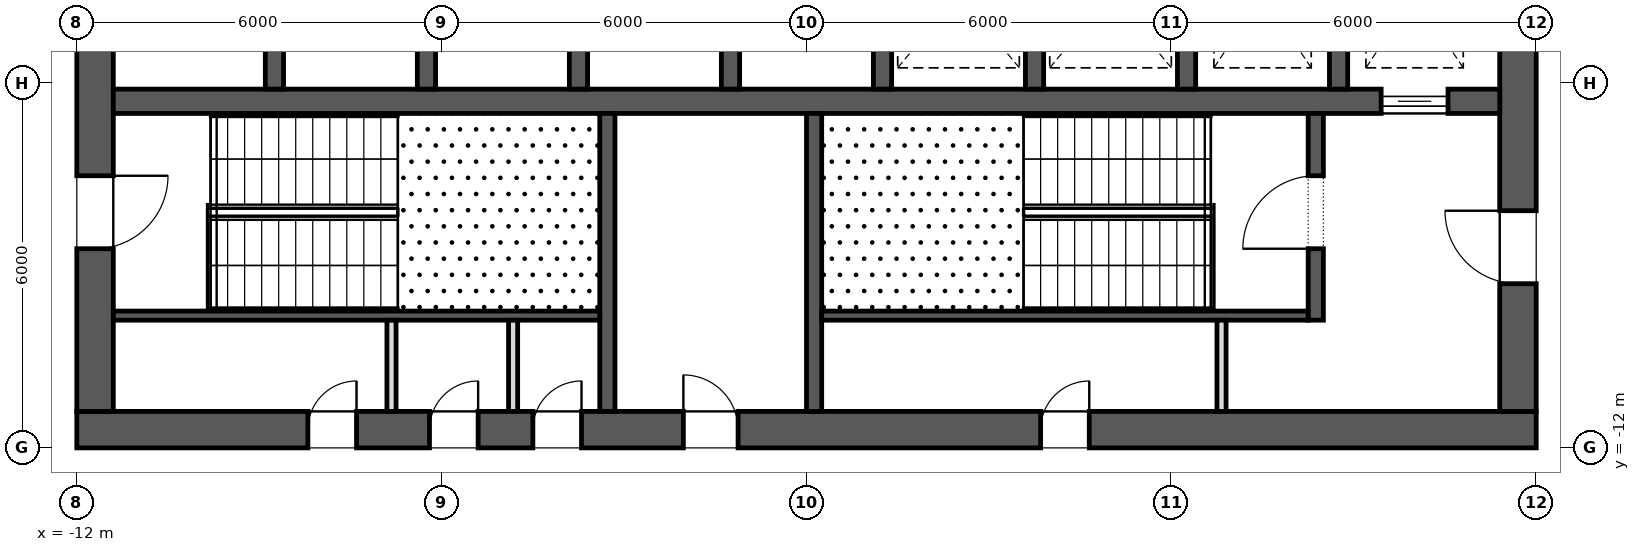
"""IFC4 building model, lengths in metres.
Left out: names, types, materials, properties, quantities, classifications, styles, units other than length and angle.
Written with IfcOpenShell. Run it as: python <this file> out.ifc"""

import sys

from ifc_helpers import new_model, si_unit, direction, frame, frame_2d, origin, place, context, subcontext, project, spatial, rectangle, extrude, element, fill, save


model = new_model("IFC4")
c1 = context("Model", 3, precision=1e-05, world=origin(), true_north=direction((0.0, 1.0)))
c2 = subcontext(c1, "Body", "Model", "MODEL_VIEW")
j1 = project(units=[si_unit("LENGTHUNIT", "METRE"), si_unit("PLANEANGLEUNIT", "RADIAN")], contexts=[c1])
p1 = place(None, origin())
s1 = spatial("IfcSite", under=j1, at=p1, CompositionType="ELEMENT")
p2 = place(p1, origin())
s2 = spatial("IfcBuilding", under=s1, at=p2, CompositionType="ELEMENT")
p3 = place(p2, frame((0.0, 0.0, 125.5)))
s3 = spatial("IfcBuildingStorey", under=s2, at=p3, CompositionType="ELEMENT", Elevation=125.5)
p4 = place(p3, frame((-12.0, -11.7, 0.0), z_axis=(0.0, 0.0, 1.0), x_axis=(1.0, 0.0, 0.0)))
e1 = element("IfcWall", 1, at=p4, inside=s3, PredefinedType="SHEAR", context=c2, shape_type="SweptSolid", body=[
    extrude(rectangle(XDim=24.0, YDim=0.6, at=frame_2d((12.0, 0.0))), origin(), (0.0, 0.0, 1.0), 4.2),
])
p5 = place(p4, frame((9.975, 0.0, 0.0)))
e2 = element("IfcOpeningElement", 2, at=p5, cuts=e1, PredefinedType="OPENING", context=c2, shape_type="SweptSolid", body=[
    extrude(rectangle(XDim=0.9, YDim=2.1, at=frame_2d((0.45, 1.05))), frame((0.0, 0.312, 0.0), z_axis=(0.0, -1.0, 0.0), x_axis=(1.0, 0.0, 0.0)), (0.0, 0.0, 1.0), 0.624),
])
p6 = place(p4, frame((3.8, 0.0, 0.0)))
e3 = element("IfcOpeningElement", 3, at=p6, cuts=e1, PredefinedType="OPENING", context=c2, shape_type="SweptSolid", body=[
    extrude(rectangle(XDim=0.8, YDim=2.1, at=frame_2d((0.4, 1.05))), frame((0.0, 0.312, 0.0), z_axis=(0.0, -1.0, 0.0), x_axis=(1.0, 0.0, 0.0)), (0.0, 0.0, 1.0), 0.624),
])
p7 = place(p4, frame((5.8, 0.0, 0.0)))
e4 = element("IfcOpeningElement", 4, at=p7, cuts=e1, PredefinedType="OPENING", context=c2, shape_type="SweptSolid", body=[
    extrude(rectangle(XDim=0.8, YDim=2.1, at=frame_2d((0.4, 1.05))), frame((0.0, 0.312, 0.0), z_axis=(0.0, -1.0, 0.0), x_axis=(1.0, 0.0, 0.0)), (0.0, 0.0, 1.0), 0.624),
])
p8 = place(p4, frame((7.5, 0.0, 0.0)))
e5 = element("IfcOpeningElement", 5, at=p8, cuts=e1, PredefinedType="OPENING", context=c2, shape_type="SweptSolid", body=[
    extrude(rectangle(XDim=0.8, YDim=2.1, at=frame_2d((0.4, 1.05))), frame((0.0, 0.312, 0.0), z_axis=(0.0, -1.0, 0.0), x_axis=(1.0, 0.0, 0.0)), (0.0, 0.0, 1.0), 0.624),
])
p9 = place(p4, frame((15.85, 0.0, 0.0)))
e6 = element("IfcOpeningElement", 6, at=p9, cuts=e1, PredefinedType="OPENING", context=c2, shape_type="SweptSolid", body=[
    extrude(rectangle(XDim=0.8, YDim=2.1, at=frame_2d((0.4, 1.05))), frame((0.0, 0.312, 0.0), z_axis=(0.0, -1.0, 0.0), x_axis=(1.0, 0.0, 0.0)), (0.0, 0.0, 1.0), 0.624),
])
p10 = place(p3, frame((11.7, -11.4, 0.0), z_axis=(0.0, 0.0, 1.0), x_axis=(0.0, 1.0, 0.0)))
e7 = element("IfcWall", 7, at=p10, inside=s3, PredefinedType="SHEAR", context=c2, shape_type="SweptSolid", body=[
    extrude(rectangle(XDim=22.8, YDim=0.6, at=frame_2d((11.4, 0.0))), origin(), (0.0, 0.0, 1.0), 4.2),
])
p11 = place(p10, frame((10.2, 0.0, 0.0)))
e8 = element("IfcOpeningElement", 8, at=p11, cuts=e7, PredefinedType="OPENING", context=c2, shape_type="SweptSolid", body=[
    extrude(rectangle(XDim=2.4, YDim=2.1, at=frame_2d((1.2, 1.05))), frame((0.0, 0.312, 0.0), z_axis=(0.0, -1.0, 0.0), x_axis=(1.0, 0.0, 0.0)), (0.0, 0.0, 1.0), 0.624),
])
p12 = place(p10, frame((19.5, 0.0, 0.0)))
e9 = element("IfcOpeningElement", 9, at=p12, cuts=e7, PredefinedType="OPENING", context=c2, shape_type="SweptSolid", body=[
    extrude(rectangle(XDim=1.2, YDim=2.1, at=frame_2d((0.6, 1.05))), frame((0.0, 0.312, 0.0), z_axis=(0.0, -1.0, 0.0), x_axis=(1.0, 0.0, 0.0)), (0.0, 0.0, 1.0), 0.624),
])
p13 = place(p10, frame((2.1, 0.0, 0.0)))
e10 = element("IfcOpeningElement", 10, at=p13, cuts=e7, PredefinedType="OPENING", context=c2, shape_type="SweptSolid", body=[
    extrude(rectangle(XDim=1.2, YDim=2.1, at=frame_2d((0.6, 1.05))), frame((0.0, 0.312, 0.0), z_axis=(0.0, -1.0, 0.0), x_axis=(1.0, 0.0, 0.0)), (0.0, 0.0, 1.0), 0.624),
])
p14 = place(p3, frame((-11.7, -11.4, 0.0), z_axis=(0.0, 0.0, 1.0), x_axis=(0.0, 1.0, 0.0)))
e11 = element("IfcWall", 11, at=p14, inside=s3, PredefinedType="SHEAR", context=c2, shape_type="SweptSolid", body=[
    extrude(rectangle(XDim=22.8, YDim=0.6, at=frame_2d((11.4, 0.0))), origin(), (0.0, 0.0, 1.0), 4.2),
])
p15 = place(p14, frame((10.2, 0.0, 0.0)))
e12 = element("IfcOpeningElement", 12, at=p15, cuts=e11, PredefinedType="OPENING", context=c2, shape_type="SweptSolid", body=[
    extrude(rectangle(XDim=2.4, YDim=2.1, at=frame_2d((1.2, 1.05))), frame((0.0, 0.312, 0.0), z_axis=(0.0, -1.0, 0.0), x_axis=(1.0, 0.0, 0.0)), (0.0, 0.0, 1.0), 0.624),
])
p16 = place(p14, frame((18.925, 0.0, 0.0)))
e13 = element("IfcOpeningElement", 13, at=p16, cuts=e11, PredefinedType="OPENING", context=c2, shape_type="SweptSolid", body=[
    extrude(rectangle(XDim=1.2, YDim=2.1, at=frame_2d((0.6, 1.05))), frame((0.0, 0.312, 0.0), z_axis=(0.0, -1.0, 0.0), x_axis=(1.0, 0.0, 0.0)), (0.0, 0.0, 1.0), 0.624),
])
p17 = place(p14, frame((2.675, 0.0, 0.0)))
e14 = element("IfcOpeningElement", 14, at=p17, cuts=e11, PredefinedType="OPENING", context=c2, shape_type="SweptSolid", body=[
    extrude(rectangle(XDim=1.2, YDim=2.1, at=frame_2d((0.6, 1.05))), frame((0.0, 0.312, 0.0), z_axis=(0.0, -1.0, 0.0), x_axis=(1.0, 0.0, 0.0)), (0.0, 0.0, 1.0), 0.624),
])
p18 = place(p3, frame((-11.4, -6.3, 0.0), z_axis=(0.0, 0.0, 1.0), x_axis=(1.0, 0.0, 0.0)))
e15 = element("IfcWall", 15, at=p18, inside=s3, PredefinedType="SHEAR", context=c2, shape_type="SweptSolid", body=[
    extrude(rectangle(XDim=22.8, YDim=0.4, at=frame_2d((11.4, 0.0))), origin(), (0.0, 0.0, 1.0), 4.2),
])
p19 = place(p18, frame((20.85, 0.0, 0.0)))
e16 = element("IfcOpeningElement", 16, at=p19, cuts=e15, PredefinedType="OPENING", context=c2, shape_type="SweptSolid", body=[
    extrude(rectangle(XDim=1.1, YDim=2.1, at=frame_2d((0.55, 1.05))), frame((0.0, 0.212, 0.0), z_axis=(0.0, -1.0, 0.0), x_axis=(1.0, 0.0, 0.0)), (0.0, 0.0, 1.0), 0.424),
])
for number, where, z_axis, x_axis in (
    (17, (-8.75, -6.1, 0.0), (0.0, 0.0, 1.0), (0.0, 1.0, 0.0)),
    (18, (-6.25, -6.1, 0.0), (0.0, 0.0, 1.0), (0.0, 1.0, 0.0)),
    (19, (-3.75, -6.1, 0.0), (0.0, 0.0, 1.0), (0.0, 1.0, 0.0)),
    (20, (-1.25, -6.1, 0.0), (0.0, 0.0, 1.0), (0.0, 1.0, 0.0)),
    (21, (1.25, -6.1, 0.0), (0.0, 0.0, 1.0), (0.0, 1.0, 0.0)),
    (22, (3.75, -6.1, 0.0), (0.0, 0.0, 1.0), (0.0, 1.0, 0.0)),
    (23, (6.25, -6.1, 0.0), (0.0, 0.0, 1.0), (0.0, 1.0, 0.0)),
    (24, (8.75, -6.1, 0.0), (0.0, 0.0, 1.0), (0.0, 1.0, 0.0)),
):
    element("IfcWall", number, at=place(p3, frame(where, z_axis=z_axis, x_axis=x_axis)), inside=s3, PredefinedType="SHEAR", context=c2, shape_type="SweptSolid", body=[
        extrude(rectangle(XDim=2.9, YDim=0.3, at=frame_2d((1.45, 0.0))), origin(), (0.0, 0.0, 1.0), 4.2),
    ])
for number, where, z_axis, x_axis in (
    (25, (-3.275, -11.4, 0.0), (0.0, 0.0, 1.0), (0.0, 1.0, 0.0)),
    (26, (0.125, -11.4, 0.0), (0.0, 0.0, 1.0), (0.0, 1.0, 0.0)),
):
    element("IfcWall", number, at=place(p3, frame(where, z_axis=z_axis, x_axis=x_axis)), inside=s3, PredefinedType="SHEAR", context=c2, shape_type="SweptSolid", body=[
        extrude(rectangle(XDim=4.9, YDim=0.25, at=frame_2d((2.45, 0.0))), origin(), (0.0, 0.0, 1.0), 3.9),
    ])
p20 = place(p3, frame((8.375, -9.9, 0.0), z_axis=(0.0, 0.0, 1.0), x_axis=(0.0, 1.0, 0.0)))
e27 = element("IfcWall", 27, at=p20, inside=s3, PredefinedType="SHEAR", context=c2, shape_type="SweptSolid", body=[
    extrude(rectangle(XDim=3.4, YDim=0.25, at=frame_2d((1.7, 0.0))), origin(), (0.0, 0.0, 1.0), 3.9),
])
p21 = place(p20, frame((1.175, 0.0, 0.0)))
e28 = element("IfcOpeningElement", 28, at=p21, cuts=e27, PredefinedType="OPENING", context=c2, shape_type="SweptSolid", body=[
    extrude(rectangle(XDim=1.2, YDim=2.1, at=frame_2d((0.6, 1.05))), frame((0.0, 0.137, 0.0), z_axis=(0.0, -1.0, 0.0), x_axis=(1.0, 0.0, 0.0)), (0.0, 0.0, 1.0), 0.274),
])
for number, where, z_axis, x_axis in (
    (29, (-11.4, -9.825, 0.0), (0.0, 0.0, 1.0), (1.0, 0.0, 0.0)),
    (30, (0.25, -9.825, 0.0), (0.0, 0.0, 1.0), (1.0, 0.0, 0.0)),
):
    element("IfcWall", number, at=place(p3, frame(where, z_axis=z_axis, x_axis=x_axis)), inside=s3, PredefinedType="SHEAR", context=c2, shape_type="SweptSolid", body=[
        extrude(rectangle(XDim=8.0, YDim=0.15, at=frame_2d((4.0, 0.0))), origin(), (0.0, 0.0, 1.0), 3.9),
    ])
for number, where, z_axis, x_axis in (
    (31, (-6.825, -11.4, 0.0), (0.0, 0.0, 1.0), (0.0, 1.0, 0.0)),
    (32, (-4.825, -11.4, 0.0), (0.0, 0.0, 1.0), (0.0, 1.0, 0.0)),
    (33, (6.825, -11.4, 0.0), (0.0, 0.0, 1.0), (0.0, 1.0, 0.0)),
):
    element("IfcWall", number, at=place(p3, frame(where, z_axis=z_axis, x_axis=x_axis)), inside=s3, PredefinedType="PARTITIONING", context=c2, shape_type="SweptSolid", body=[
        extrude(rectangle(XDim=1.5, YDim=0.15, at=frame_2d((0.75, 0.0))), origin(), (0.0, 0.0, 1.0), 3.9),
    ])
p22 = place(p19, origin())
e34 = element("IfcDoor", 34, at=p22, inside=s3, OperationType="SLIDING_TO_LEFT", PredefinedType="DOOR", context=c2, shape_type="SweptSolid", body=[
    extrude(rectangle(XDim=1.1, YDim=2.1, at=frame_2d((0.55, 1.05))), frame((0.0, 0.025, 0.0), z_axis=(0.0, -1.0, 0.0), x_axis=(1.0, 0.0, 0.0)), (0.0, 0.0, 1.0), 0.05),
])
fill(e16, e34)
p23 = place(p17, frame((1.2, 0.0, 0.0), z_axis=(0.0, 0.0, 1.0), x_axis=(-1.0, 0.0, 0.0)))
e35 = element("IfcDoor", 35, at=p23, inside=s3, OperationType="SINGLE_SWING_RIGHT", PredefinedType="DOOR", context=c2, shape_type="SweptSolid", body=[
    extrude(rectangle(XDim=1.2, YDim=2.1, at=frame_2d((0.6, 1.05))), frame((0.0, 0.025, 0.0), z_axis=(0.0, -1.0, 0.0), x_axis=(1.0, 0.0, 0.0)), (0.0, 0.0, 1.0), 0.05),
])
fill(e14, e35)
p24 = place(p21, origin())
e36 = element("IfcDoor", 36, at=p24, inside=s3, OperationType="SINGLE_SWING_RIGHT", PredefinedType="DOOR", context=c2, shape_type="SweptSolid", body=[
    extrude(rectangle(XDim=1.2, YDim=2.1, at=frame_2d((0.6, 1.05))), frame((0.0, 0.025, 0.0), z_axis=(0.0, -1.0, 0.0), x_axis=(1.0, 0.0, 0.0)), (0.0, 0.0, 1.0), 0.05),
])
fill(e28, e36)
p25 = place(p13, origin())
e37 = element("IfcDoor", 37, at=p25, inside=s3, OperationType="SINGLE_SWING_LEFT", PredefinedType="DOOR", context=c2, shape_type="SweptSolid", body=[
    extrude(rectangle(XDim=1.2, YDim=2.1, at=frame_2d((0.6, 1.05))), frame((0.0, 0.025, 0.0), z_axis=(0.0, -1.0, 0.0), x_axis=(1.0, 0.0, 0.0)), (0.0, 0.0, 1.0), 0.05),
])
fill(e10, e37)
p26 = place(p5, origin())
e38 = element("IfcDoor", 38, at=p26, inside=s3, OperationType="SINGLE_SWING_RIGHT", PredefinedType="DOOR", context=c2, shape_type="SweptSolid", body=[
    extrude(rectangle(XDim=0.9, YDim=2.1, at=frame_2d((0.45, 1.05))), frame((0.0, 0.025, 0.0), z_axis=(0.0, -1.0, 0.0), x_axis=(1.0, 0.0, 0.0)), (0.0, 0.0, 1.0), 0.05),
])
fill(e2, e38)
p27 = place(p6, origin())
e39 = element("IfcDoor", 39, at=p27, inside=s3, OperationType="SINGLE_SWING_LEFT", PredefinedType="DOOR", context=c2, shape_type="SweptSolid", body=[
    extrude(rectangle(XDim=0.8, YDim=2.1, at=frame_2d((0.4, 1.05))), frame((0.0, 0.025, 0.0), z_axis=(0.0, -1.0, 0.0), x_axis=(1.0, 0.0, 0.0)), (0.0, 0.0, 1.0), 0.05),
])
fill(e3, e39)
p28 = place(p7, origin())
e40 = element("IfcDoor", 40, at=p28, inside=s3, OperationType="SINGLE_SWING_LEFT", PredefinedType="DOOR", context=c2, shape_type="SweptSolid", body=[
    extrude(rectangle(XDim=0.8, YDim=2.1, at=frame_2d((0.4, 1.05))), frame((0.0, 0.025, 0.0), z_axis=(0.0, -1.0, 0.0), x_axis=(1.0, 0.0, 0.0)), (0.0, 0.0, 1.0), 0.05),
])
fill(e4, e40)
p29 = place(p8, origin())
e41 = element("IfcDoor", 41, at=p29, inside=s3, OperationType="SINGLE_SWING_LEFT", PredefinedType="DOOR", context=c2, shape_type="SweptSolid", body=[
    extrude(rectangle(XDim=0.8, YDim=2.1, at=frame_2d((0.4, 1.05))), frame((0.0, 0.025, 0.0), z_axis=(0.0, -1.0, 0.0), x_axis=(1.0, 0.0, 0.0)), (0.0, 0.0, 1.0), 0.05),
])
fill(e5, e41)
p30 = place(p9, origin())
e42 = element("IfcDoor", 42, at=p30, inside=s3, OperationType="SINGLE_SWING_LEFT", PredefinedType="DOOR", context=c2, shape_type="SweptSolid", body=[
    extrude(rectangle(XDim=0.8, YDim=2.1, at=frame_2d((0.4, 1.05))), frame((0.0, 0.025, 0.0), z_axis=(0.0, -1.0, 0.0), x_axis=(1.0, 0.0, 0.0)), (0.0, 0.0, 1.0), 0.05),
])
fill(e6, e42)
save(model, sys.argv[1])
